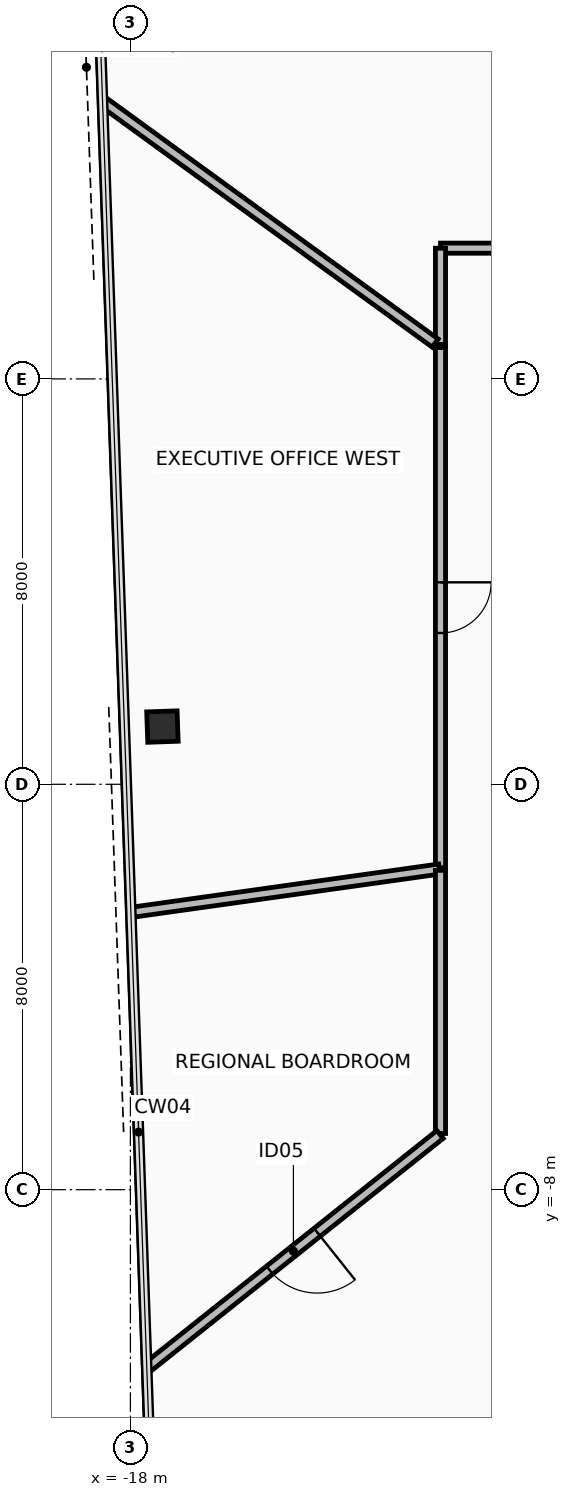
"""IFC4 building model, lengths in metres.
Left out: names, types, materials, properties, quantities, classifications, styles, units other than length and angle.
Written with IfcOpenShell. Run it as: python <this file> out.ifc"""

import sys

from ifc_helpers import new_model, si_unit, direction, frame, frame_2d, origin, origin_2d, place, context, subcontext, project, spatial, rectangle, hollow_rectangle, extrude, element, fill, save


model = new_model("IFC4")
c1 = context("Model", 3, precision=1e-05, world=origin(), true_north=direction((0.0, 1.0)))
c2 = subcontext(c1, "Body", "Model", "MODEL_VIEW")
j1 = project(units=[si_unit("LENGTHUNIT", "METRE"), si_unit("PLANEANGLEUNIT", "RADIAN")], contexts=[c1])
p1 = place(None, origin())
s1 = spatial("IfcSite", under=j1, at=p1, CompositionType="ELEMENT")
p2 = place(p1, origin())
s2 = spatial("IfcBuilding", under=s1, at=p2, CompositionType="ELEMENT")
p3 = place(p2, frame((0.0, 0.0, 138.8)))
s3 = spatial("IfcBuildingStorey", under=s2, at=p3, CompositionType="ELEMENT", Elevation=138.8)
p4 = place(p3, frame((-17.368, 1.139, -0.19), z_axis=(0.0, 0.0, 1.0), x_axis=(-0.034899496703, 0.999390827019, 0.0)))
e1 = element("IfcColumn", 1, at=p4, inside=s3, PredefinedType="COLUMN", context=c2, shape_type="SweptSolid", body=[
    extrude(hollow_rectangle(XDim=0.6, YDim=0.6, WallThickness=0.036, at=origin_2d()), origin(), (0.0, 0.0, 1.0), 3.79),
])
p5 = place(p3, frame((-2.746, 10.58, 0.0), z_axis=(0.0, 0.0, 1.0), x_axis=(-1.0, 0.0, 0.0)))
e2 = element("IfcWall", 2, at=p5, inside=s3, PredefinedType="PARTITIONING", context=c2, shape_type="SweptSolid", body=[
    extrude(rectangle(XDim=9.133, YDim=0.2, at=frame_2d((4.567, 0.0))), origin(), (0.0, 0.0, 1.0), 2.755),
])
p6 = place(p5, frame((4.067, 0.0, 0.0)))
e3 = element("IfcOpeningElement", 3, at=p6, cuts=e2, PredefinedType="OPENING", context=c2, shape_type="SweptSolid", body=[
    extrude(rectangle(XDim=1.0, YDim=2.15, at=frame_2d((0.5, 1.075))), frame((0.0, 0.11, 0.0), z_axis=(0.0, -1.0, 0.0), x_axis=(1.0, 0.0, 0.0)), (0.0, 0.0, 1.0), 0.22),
])
p7 = place(p3, frame((-11.88, 10.579, 0.0), z_axis=(0.0, 0.0, 1.0), x_axis=(0.0, -1.0, 0.0)))
e4 = element("IfcWall", 4, at=p7, inside=s3, PredefinedType="PARTITIONING", context=c2, shape_type="SweptSolid", body=[
    extrude(rectangle(XDim=1.899, YDim=0.2, at=frame_2d((0.949, 0.0))), origin(), (0.0, 0.0, 1.0), 2.855),
])
p8 = place(p3, frame((-11.985, 8.708, 0.0), z_axis=(0.0, 0.0, 1.0), x_axis=(-0.80901356524, 0.587789972063, 0.0)))
e5 = element("IfcWall", 5, at=p8, inside=s3, PredefinedType="PARTITIONING", context=c2, shape_type="SweptSolid", body=[
    extrude(rectangle(XDim=8.102, YDim=0.2, at=frame_2d((4.051, 0.0))), origin(), (0.0, 0.0, 1.0), 2.705),
])
p9 = place(p3, frame((-11.88, 8.619, 0.0), z_axis=(0.0, 0.0, 1.0), x_axis=(0.0, -1.0, 0.0)))
e6 = element("IfcWall", 6, at=p9, inside=s3, PredefinedType="PARTITIONING", context=c2, shape_type="SweptSolid", body=[
    extrude(rectangle(XDim=10.267, YDim=0.2, at=frame_2d((5.133, 0.0))), origin(), (0.0, 0.0, 1.0), 2.855),
])
p10 = place(p9, frame((4.633, 0.0, 0.0)))
e7 = element("IfcOpeningElement", 7, at=p10, cuts=e6, PredefinedType="OPENING", context=c2, shape_type="SweptSolid", body=[
    extrude(rectangle(XDim=1.0, YDim=2.15, at=frame_2d((0.5, 1.075))), frame((0.0, 0.11, 0.0), z_axis=(0.0, -1.0, 0.0), x_axis=(1.0, 0.0, 0.0)), (0.0, 0.0, 1.0), 0.22),
])
p11 = place(p3, frame((-11.902, -1.673, 0.0), z_axis=(0.0, 0.0, 1.0), x_axis=(-0.990268435755, -0.139170489501, 0.0)))
e8 = element("IfcWall", 8, at=p11, inside=s3, PredefinedType="PARTITIONING", context=c2, shape_type="SweptSolid", body=[
    extrude(rectangle(XDim=6.121, YDim=0.2, at=frame_2d((3.06, 0.0))), origin(), (0.0, 0.0, 1.0), 2.705),
])
p12 = place(p3, frame((-11.88, -1.698, 0.0), z_axis=(0.0, 0.0, 1.0), x_axis=(0.0, -1.0, 0.0)))
e9 = element("IfcWall", 9, at=p12, inside=s3, PredefinedType="PARTITIONING", context=c2, shape_type="SweptSolid", body=[
    extrude(rectangle(XDim=5.193, YDim=0.2, at=frame_2d((2.596, 0.0))), origin(), (0.0, 0.0, 1.0), 3.41),
])
p13 = place(p3, frame((-11.889, -6.911, 0.0), z_axis=(0.0, 0.0, 1.0), x_axis=(-0.782386471956, -0.622793230936, 0.0)))
e10 = element("IfcWall", 10, at=p13, inside=s3, PredefinedType="PARTITIONING", context=c2, shape_type="SweptSolid", body=[
    extrude(rectangle(XDim=7.396, YDim=0.2, at=frame_2d((3.698, 0.0))), origin(), (0.0, 0.0, 1.0), 2.705),
])
p14 = place(p13, frame((3.098, 0.0, 0.0)))
e11 = element("IfcOpeningElement", 11, at=p14, cuts=e10, PredefinedType="OPENING", context=c2, shape_type="SweptSolid", body=[
    extrude(rectangle(XDim=1.2, YDim=2.15, at=frame_2d((0.6, 1.075))), frame((0.0, 0.11, 0.0), z_axis=(0.0, -1.0, 0.0), x_axis=(1.0, 0.0, 0.0)), (0.0, 0.0, 1.0), 0.22),
])
p15 = place(p3, frame((-17.299, -22.142, 0.0), z_axis=(0.0, 0.0, 1.0), x_axis=(0.615665047481, 0.78800796272, 0.0)))
e12 = element("IfcWall", 12, at=p15, inside=s3, PredefinedType="PARTITIONING", context=c2, shape_type="SweptSolid", body=[
    extrude(rectangle(XDim=14.66, YDim=0.2, at=frame_2d((7.33, 0.0))), origin(), (0.0, 0.0, 1.0), 2.705),
])
p16 = place(p10, origin())
e13 = element("IfcDoor", 13, at=p16, inside=s3, OperationType="SINGLE_SWING_RIGHT", PredefinedType="DOOR", context=c2, shape_type="SweptSolid", body=[
    extrude(rectangle(XDim=1.0, YDim=2.15, at=frame_2d((0.5, 1.075))), frame((0.0, 0.025, 0.0), z_axis=(0.0, -1.0, 0.0), x_axis=(1.0, 0.0, 0.0)), (0.0, 0.0, 1.0), 0.05),
])
fill(e7, e13)
p17 = place(p14, origin())
e14 = element("IfcDoor", 14, at=p17, inside=s3, OperationType="SINGLE_SWING_LEFT", PredefinedType="DOOR", context=c2, shape_type="SweptSolid", body=[
    extrude(rectangle(XDim=1.2, YDim=2.15, at=frame_2d((0.6, 1.075))), frame((0.0, 0.025, 0.0), z_axis=(0.0, -1.0, 0.0), x_axis=(1.0, 0.0, 0.0)), (0.0, 0.0, 1.0), 0.05),
])
fill(e11, e14)
save(model, sys.argv[1])
